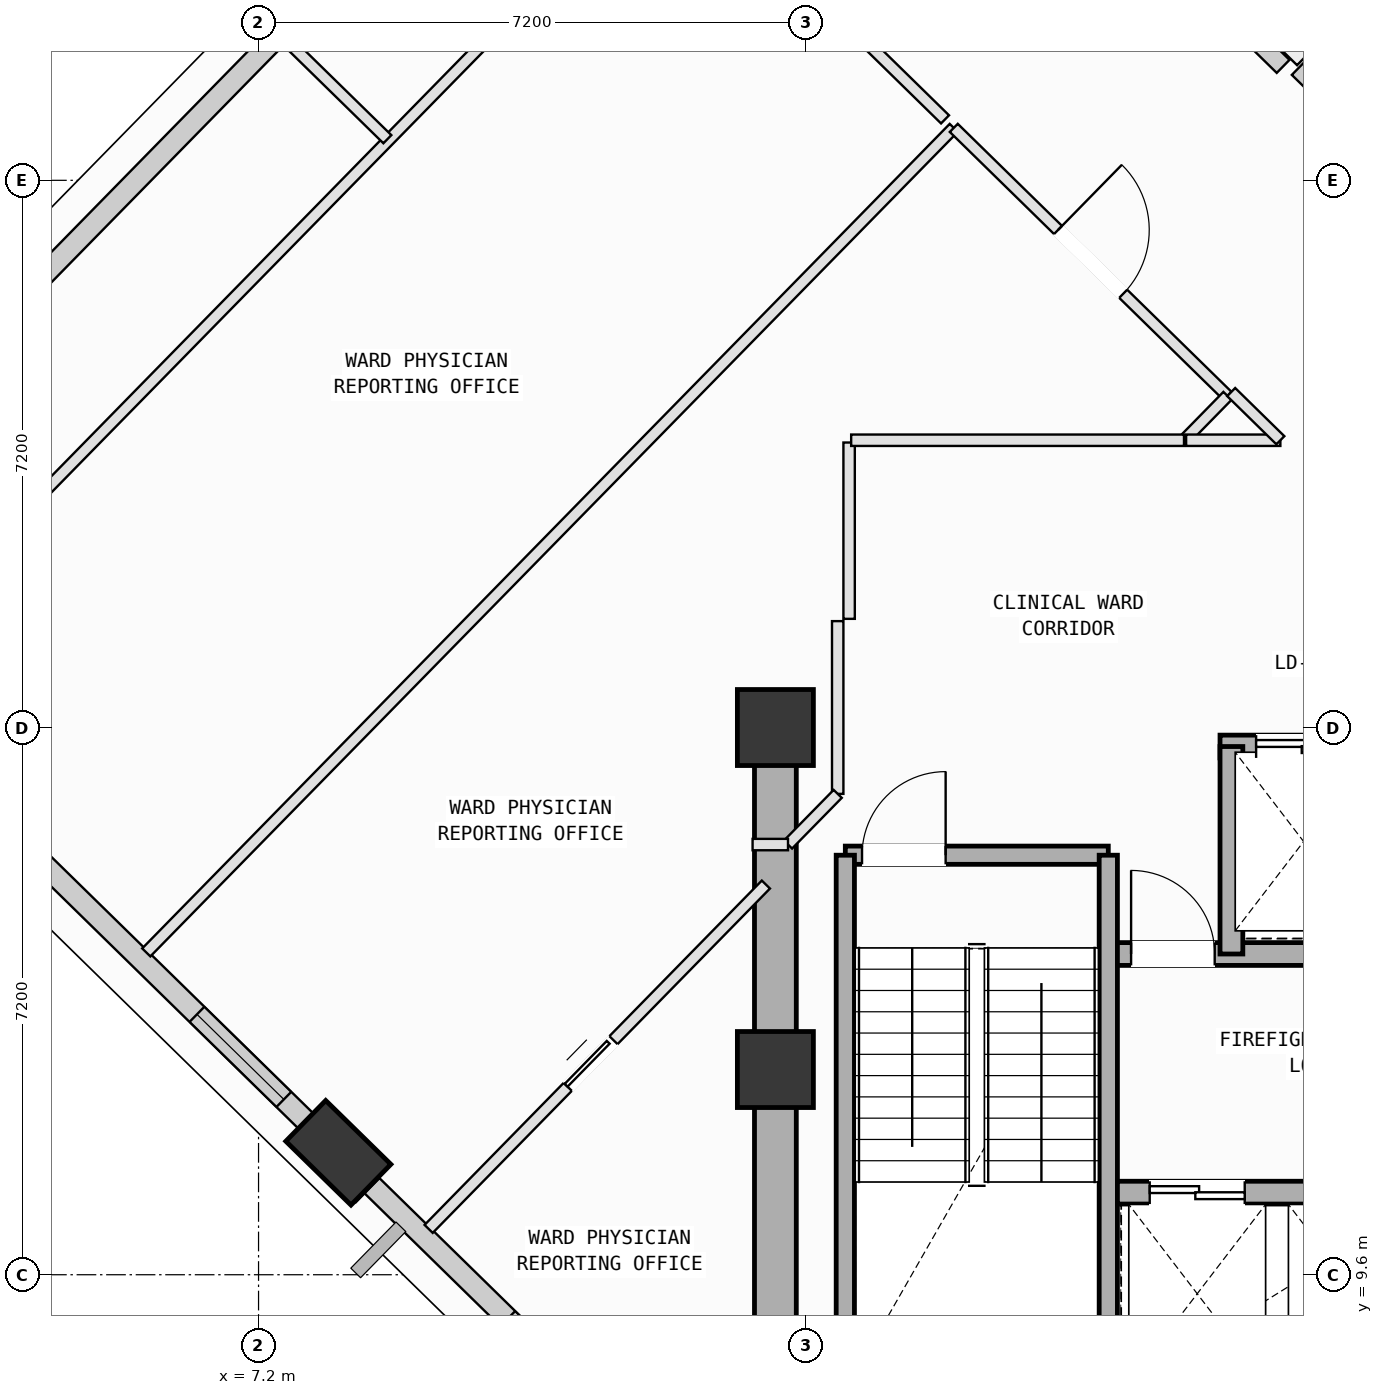
"""IFC4 building model, lengths in metres.
Left out: names, types, materials, properties, quantities, classifications, styles, units other than length and angle.
Written with IfcOpenShell. Run it as: python <this file> out.ifc"""

import sys

from ifc_helpers import new_model, si_unit, direction, frame, frame_2d, origin, origin_2d, place, context, subcontext, project, spatial, rectangle, extrude, element, fill, save


model = new_model("IFC4")
c1 = context("Model", 3, precision=1e-05, world=origin(), true_north=direction((0.0, 1.0)))
c2 = subcontext(c1, "Body", "Model", "MODEL_VIEW")
j1 = project(units=[si_unit("LENGTHUNIT", "METRE"), si_unit("PLANEANGLEUNIT", "RADIAN")], contexts=[c1])
p1 = place(None, origin())
s1 = spatial("IfcSite", under=j1, at=p1, CompositionType="ELEMENT")
p2 = place(p1, origin())
s2 = spatial("IfcBuilding", under=s1, at=p2, CompositionType="ELEMENT")
p3 = place(p2, frame((0.0, 0.0, 219.2)))
s3 = spatial("IfcBuildingStorey", under=s2, at=p3, CompositionType="ELEMENT", Elevation=219.2)
for number, where, z_axis, x_axis in (
    (1, (14.0, 12.3, 0.0), (0.0, 0.0, 1.0), (1.0, 0.0, 0.0)),
    (2, (14.0, 16.8, 0.0), (0.0, 0.0, 1.0), (1.0, 0.0, 0.0)),
):
    element("IfcColumn", number, at=place(p3, frame(where, z_axis=z_axis, x_axis=x_axis)), inside=s3, PredefinedType="COLUMN", context=c2, shape_type="SweptSolid", body=[
        extrude(rectangle(XDim=1.0, YDim=1.0, at=origin_2d()), origin(), (0.0, 0.0, 1.0), 4.0),
    ])
p4 = place(p3, frame((8.25, 11.205, 0.002), z_axis=(0.05677931028, -0.103852755554, 0.992970651675), x_axis=(-0.960175021282, 0.266844486947, 0.082812730257)))
e3 = element("IfcColumn", 3, at=p4, inside=s3, PredefinedType="COLUMN", context=c2, shape_type="SweptSolid", body=[
    extrude(rectangle(XDim=1.2, YDim=0.75, at=origin_2d()), origin(), (0.0, 0.0, 1.0), 4.025),
])
p5 = place(p3, frame((15.708, 30.369, 0.0), z_axis=(0.0, 0.0, 1.0), x_axis=(0.71445197499, -0.699684482773, 0.0)))
e4 = element("IfcWall", 4, at=p5, inside=s3, PredefinedType="SOLIDWALL", context=c2, shape_type="SweptSolid", body=[
    extrude(rectangle(XDim=6.96, YDim=0.24, at=frame_2d((3.48, 0.0))), origin(), (0.0, 0.0, 1.0), 3.265),
])
p6 = place(p5, frame((3.597, 0.0, 0.0)))
e5 = element("IfcOpeningElement", 5, at=p6, cuts=e4, PredefinedType="OPENING", context=c2, shape_type="SweptSolid", body=[
    extrude(rectangle(XDim=1.1, YDim=2.15, at=frame_2d((0.55, 1.075))), frame((0.0, 0.13, 0.0), z_axis=(0.0, -1.0, 0.0), x_axis=(1.0, 0.0, 0.0)), (0.0, 0.0, 1.0), 0.26),
])
p7 = place(p3, frame((20.88, 25.303, 0.0), z_axis=(0.0, 0.0, 1.0), x_axis=(0.699645566709, 0.714490084595, 0.0)))
e6 = element("IfcWall", 6, at=p7, inside=s3, PredefinedType="SOLIDWALL", context=c2, shape_type="SweptSolid", body=[
    extrude(rectangle(XDim=2.5, YDim=0.24, at=frame_2d((1.25, 0.0))), origin(), (0.0, 0.0, 1.0), 3.265),
])
p8 = place(p3, frame((2.724, 21.069, 0.0), z_axis=(0.0, 0.0, 1.0), x_axis=(0.699663647381, 0.714472379125, 0.0)))
e7 = element("IfcWall", 7, at=p8, inside=s3, PredefinedType="SOLIDWALL", context=c2, shape_type="SweptSolid", body=[
    extrude(rectangle(XDim=7.485, YDim=0.28, at=frame_2d((3.742, 0.0))), origin(), (0.0, 0.0, 1.0), 3.265),
])
p9 = place(p3, frame((8.133, 11.319, 0.0), z_axis=(0.0, 0.0, 1.0), x_axis=(-0.714479464063, 0.699656412414, 0.0)))
e8 = element("IfcWall", 8, at=p9, inside=s3, PredefinedType="SOLIDWALL", context=c2, shape_type="SweptSolid", body=[
    extrude(rectangle(XDim=5.831, YDim=0.28, at=frame_2d((2.915, 0.0))), origin(), (0.0, 0.0, 1.0), 3.265),
])
p10 = place(p9, frame((0.84, 0.0, 0.75)))
e9 = element("IfcOpeningElement", 9, at=p10, cuts=e8, PredefinedType="OPENING", context=c2, shape_type="SweptSolid", body=[
    extrude(rectangle(XDim=1.6, YDim=1.95, at=frame_2d((0.8, 0.975))), frame((0.0, 0.15, 0.0), z_axis=(0.0, -1.0, 0.0), x_axis=(1.0, 0.0, 0.0)), (0.0, 0.0, 1.0), 0.3),
])
p11 = place(p3, frame((12.88, 6.671, 0.0), z_axis=(0.0, 0.0, 1.0), x_axis=(-0.714482661458, 0.699653147263, 0.0)))
e10 = element("IfcWall", 10, at=p11, inside=s3, PredefinedType="SOLIDWALL", context=c2, shape_type="SweptSolid", body=[
    extrude(rectangle(XDim=5.861, YDim=0.28, at=frame_2d((2.93, 0.0))), origin(), (0.0, 0.0, 1.0), 3.265),
])
p12 = place(p11, frame((1.36, 0.0, 0.75)))
e11 = element("IfcOpeningElement", 11, at=p12, cuts=e10, PredefinedType="OPENING", context=c2, shape_type="SweptSolid", body=[
    extrude(rectangle(XDim=2.0, YDim=1.95, at=frame_2d((1.0, 0.975))), frame((0.0, 0.15, 0.0), z_axis=(0.0, -1.0, 0.0), x_axis=(1.0, 0.0, 0.0)), (0.0, 0.0, 1.0), 0.3),
])
p13 = place(p3, frame((14.92, 15.12, 0.0), z_axis=(0.0, 0.0, 1.0), x_axis=(1.0, 0.0, 0.0)))
e12 = element("IfcWall", 12, at=p13, inside=s3, PredefinedType="SOLIDWALL", context=c2, shape_type="SweptSolid", body=[
    extrude(rectangle(XDim=3.46, YDim=0.24, at=frame_2d((1.73, 0.0))), origin(), (0.0, 0.0, 1.0), 3.78),
])
p14 = place(p13, frame((0.22, 0.0, 0.0)))
e13 = element("IfcOpeningElement", 13, at=p14, cuts=e12, PredefinedType="OPENING", context=c2, shape_type="SweptSolid", body=[
    extrude(rectangle(XDim=1.1, YDim=2.15, at=frame_2d((0.55, 1.075))), frame((0.0, 0.13, 0.0), z_axis=(0.0, -1.0, 0.0), x_axis=(1.0, 0.0, 0.0)), (0.0, 0.0, 1.0), 0.26),
])
for number, where, z_axis, x_axis in (
    (14, (18.38, 15.12, 0.0), (0.0, 0.0, 1.0), (0.0, -1.0, 0.0)),
    (15, (14.92, 8.075, 0.0), (0.0, 0.0, 1.0), (0.0, 1.0, 0.0)),
):
    element("IfcWall", number, at=place(p3, frame(where, z_axis=z_axis, x_axis=x_axis)), inside=s3, PredefinedType="SOLIDWALL", context=c2, shape_type="SweptSolid", body=[
        extrude(rectangle(XDim=7.045, YDim=0.24, at=frame_2d((3.522, 0.0))), origin(), (0.0, 0.0, 1.0), 3.78),
    ])
p15 = place(p3, frame((14.0, 16.8, 0.0), z_axis=(0.0, 0.0, 1.0), x_axis=(0.0, -1.0, 0.0)))
e16 = element("IfcWall", 16, at=p15, inside=s3, PredefinedType="SHEAR", context=c2, shape_type="SweptSolid", body=[
    extrude(rectangle(XDim=9.0, YDim=0.55, at=frame_2d((4.5, 0.0))), origin(), (0.0, 0.0, 1.0), 3.78),
])
p16 = place(p3, frame((19.85, 16.55, 0.0), z_axis=(0.0, 0.0, 1.0), x_axis=(1.0, 0.0, 0.0)))
e17 = element("IfcWall", 17, at=p16, inside=s3, PredefinedType="SOLIDWALL", context=c2, shape_type="SweptSolid", body=[
    extrude(rectangle(XDim=4.45, YDim=0.3, at=frame_2d((2.225, 0.0))), origin(), (0.0, 0.0, 1.0), 3.78),
])
p17 = place(p16, frame((0.475, 0.0, 0.0)))
e18 = element("IfcOpeningElement", 18, at=p17, cuts=e17, PredefinedType="OPENING", context=c2, shape_type="SweptSolid", body=[
    extrude(rectangle(XDim=1.25, YDim=2.18, at=frame_2d((0.625, 1.09))), frame((0.0, 0.16, 0.0), z_axis=(0.0, -1.0, 0.0), x_axis=(1.0, 0.0, 0.0)), (0.0, 0.0, 1.0), 0.32),
])
p18 = place(p16, frame((2.49, 0.0, 0.0)))
e19 = element("IfcOpeningElement", 19, at=p18, cuts=e17, PredefinedType="OPENING", context=c2, shape_type="SweptSolid", body=[
    extrude(rectangle(XDim=1.02, YDim=2.12, at=frame_2d((0.51, 1.06))), frame((0.0, 0.16, 0.0), z_axis=(0.0, -1.0, 0.0), x_axis=(1.0, 0.0, 0.0)), (0.0, 0.0, 1.0), 0.32),
])
p19 = place(p3, frame((18.5, 10.68, 0.0), z_axis=(0.0, 0.0, 1.0), x_axis=(1.0, 0.0, 0.0)))
e20 = element("IfcWall", 20, at=p19, inside=s3, PredefinedType="SOLIDWALL", context=c2, shape_type="SweptSolid", body=[
    extrude(rectangle(XDim=5.3, YDim=0.3, at=frame_2d((2.65, 0.0))), origin(), (0.0, 0.0, 1.0), 3.78),
])
p20 = place(p19, frame((4.22, 0.0, 0.0)))
e21 = element("IfcOpeningElement", 21, at=p20, cuts=e20, PredefinedType="OPENING", context=c2, shape_type="SweptSolid", body=[
    extrude(rectangle(XDim=0.86, YDim=2.06, at=frame_2d((0.43, 1.03))), frame((0.0, 0.16, 0.0), z_axis=(0.0, -1.0, 0.0), x_axis=(1.0, 0.0, 0.0)), (0.0, 0.0, 1.0), 0.32),
])
p21 = place(p19, frame((0.425, 0.0, 0.0)))
e22 = element("IfcOpeningElement", 22, at=p21, cuts=e20, PredefinedType="OPENING", context=c2, shape_type="SweptSolid", body=[
    extrude(rectangle(XDim=1.25, YDim=2.18, at=frame_2d((0.625, 1.09))), frame((0.0, 0.16, 0.0), z_axis=(0.0, -1.0, 0.0), x_axis=(1.0, 0.0, 0.0)), (0.0, 0.0, 1.0), 0.32),
])
p22 = place(p19, frame((2.525, 0.0, 0.0)))
e23 = element("IfcOpeningElement", 23, at=p22, cuts=e20, PredefinedType="OPENING", context=c2, shape_type="SweptSolid", body=[
    extrude(rectangle(XDim=1.25, YDim=2.18, at=frame_2d((0.625, 1.09))), frame((0.0, 0.16, 0.0), z_axis=(0.0, -1.0, 0.0), x_axis=(1.0, 0.0, 0.0)), (0.0, 0.0, 1.0), 0.32),
])
p23 = place(p3, frame((18.5, 13.82, 0.0), z_axis=(0.0, 0.0, 1.0), x_axis=(1.0, 0.0, 0.0)))
e24 = element("IfcWall", 24, at=p23, inside=s3, PredefinedType="SOLIDWALL", context=c2, shape_type="SweptSolid", body=[
    extrude(rectangle(XDim=5.3, YDim=0.3, at=frame_2d((2.65, 0.0))), origin(), (0.0, 0.0, 1.0), 3.78),
])
p24 = place(p23, frame((0.18, 0.0, 0.0)))
e25 = element("IfcOpeningElement", 25, at=p24, cuts=e24, PredefinedType="OPENING", context=c2, shape_type="SweptSolid", body=[
    extrude(rectangle(XDim=1.1, YDim=2.15, at=frame_2d((0.55, 1.075))), frame((0.0, 0.16, 0.0), z_axis=(0.0, -1.0, 0.0), x_axis=(1.0, 0.0, 0.0)), (0.0, 0.0, 1.0), 0.32),
])
p25 = place(p3, frame((20.0, 13.82, 0.0), z_axis=(0.0, 0.0, 1.0), x_axis=(0.0, 1.0, 0.0)))
e26 = element("IfcWall", 26, at=p25, inside=s3, PredefinedType="SOLIDWALL", context=c2, shape_type="SweptSolid", body=[
    extrude(rectangle(XDim=2.73, YDim=0.3, at=frame_2d((1.365, 0.0))), origin(), (0.0, 0.0, 1.0), 3.78),
])
p26 = place(p3, frame((9.438, 10.203, 0.0), z_axis=(0.0, 0.0, 1.0), x_axis=(0.699657139169, 0.714478752385, 0.0)))
e27 = element("IfcWall", 27, at=p26, inside=s3, PredefinedType="PARTITIONING", context=c2, shape_type="SweptSolid", body=[
    extrude(rectangle(XDim=6.342, YDim=0.15, at=frame_2d((3.171, 0.0))), origin(), (0.0, 0.0, 1.0), 3.78),
])
p27 = place(p26, frame((2.616, 0.0, 0.0)))
e28 = element("IfcOpeningElement", 28, at=p27, cuts=e27, PredefinedType="OPENING", context=c2, shape_type="SweptSolid", body=[
    extrude(rectangle(XDim=0.86, YDim=2.06, at=frame_2d((0.43, 1.03))), frame((0.0, 0.085, 0.0), z_axis=(0.0, -1.0, 0.0), x_axis=(1.0, 0.0, 0.0)), (0.0, 0.0, 1.0), 0.17),
])
p28 = place(p3, frame((14.97, 20.55, 0.0), z_axis=(0.0, 0.0, 1.0), x_axis=(0.0, -1.0, 0.0)))
e29 = element("IfcWall", 29, at=p28, inside=s3, PredefinedType="PARTITIONING", context=c2, shape_type="SweptSolid", body=[
    extrude(rectangle(XDim=2.32, YDim=0.15, at=frame_2d((1.16, 0.0))), origin(), (0.0, 0.0, 1.0), 3.78),
])
p29 = place(p3, frame((14.82, 18.2, 0.0), z_axis=(0.0, 0.0, 1.0), x_axis=(0.0, -1.0, 0.0)))
e30 = element("IfcWall", 30, at=p29, inside=s3, PredefinedType="PARTITIONING", context=c2, shape_type="SweptSolid", body=[
    extrude(rectangle(XDim=2.273, YDim=0.15, at=frame_2d((1.136, 0.0))), origin(), (0.0, 0.0, 1.0), 3.78),
])
p30 = place(p3, frame((14.82, 15.927, 0.0), z_axis=(0.0, 0.0, 1.0), x_axis=(-0.700147182602, -0.713998545303, 0.0)))
e31 = element("IfcWall", 31, at=p30, inside=s3, PredefinedType="PARTITIONING", context=c2, shape_type="SweptSolid", body=[
    extrude(rectangle(XDim=0.934, YDim=0.15, at=frame_2d((0.467, 0.0))), origin(), (0.0, 0.0, 1.0), 3.78),
])
p31 = place(p3, frame((14.166, 15.26, 0.0), z_axis=(0.0, 0.0, 1.0), x_axis=(-1.0, 0.0, 0.0)))
e32 = element("IfcWall", 32, at=p31, inside=s3, PredefinedType="PARTITIONING", context=c2, shape_type="SweptSolid", body=[
    extrude(rectangle(XDim=0.466, YDim=0.15, at=frame_2d((0.233, 0.0))), origin(), (0.0, 0.0, 1.0), 3.78),
])
p32 = place(p3, frame((8.532, 10.607, 0.0), z_axis=(0.0, 0.0, 1.0), x_axis=(-0.714698587823, 0.699432576139, 0.0)))
e33 = element("IfcWall", 33, at=p32, inside=s3, PredefinedType="PARTITIONING", context=c2, shape_type="SweptSolid", body=[
    extrude(rectangle(XDim=0.784, YDim=0.15, at=frame_2d((0.392, 0.0))), origin(), (0.0, 0.0, 1.0), 3.265),
])
p33 = place(p3, frame((5.723, 13.841, 0.0), z_axis=(0.0, 0.0, 1.0), x_axis=(0.69966395239, 0.714472080438, 0.0)))
e34 = element("IfcWall", 34, at=p33, inside=s3, PredefinedType="PARTITIONING", context=c2, shape_type="SweptSolid", body=[
    extrude(rectangle(XDim=15.185, YDim=0.15, at=frame_2d((7.592, 0.0))), origin(), (0.0, 0.0, 1.0), 3.78),
])
p34 = place(p3, frame((16.347, 24.69, 0.0), z_axis=(0.0, 0.0, 1.0), x_axis=(0.714527579213, -0.699607274508, 0.0)))
e35 = element("IfcWall", 35, at=p34, inside=s3, PredefinedType="PARTITIONING", context=c2, shape_type="SweptSolid", body=[
    extrude(rectangle(XDim=5.04, YDim=0.15, at=frame_2d((2.52, 0.0))), origin(), (0.0, 0.0, 1.0), 3.78),
])
p35 = place(p34, frame((1.92, 0.0, 0.0)))
e36 = element("IfcOpeningElement", 36, at=p35, cuts=e35, PredefinedType="OPENING", context=c2, shape_type="SweptSolid", body=[
    extrude(rectangle(XDim=1.2, YDim=2.15, at=frame_2d((0.6, 1.075))), frame((0.0, 0.085, 0.0), z_axis=(0.0, -1.0, 0.0), x_axis=(1.0, 0.0, 0.0)), (0.0, 0.0, 1.0), 0.17),
])
p36 = place(p3, frame((19.948, 21.164, 0.0), z_axis=(0.0, 0.0, 1.0), x_axis=(-0.699751841197, -0.714386002622, 0.0)))
e37 = element("IfcWall", 37, at=p36, inside=s3, PredefinedType="PARTITIONING", context=c2, shape_type="SweptSolid", body=[
    extrude(rectangle(XDim=0.817, YDim=0.15, at=frame_2d((0.409, 0.0))), origin(), (0.0, 0.0, 1.0), 3.78),
])
p37 = place(p3, frame((19.376, 20.58, 0.0), z_axis=(0.0, 0.0, 1.0), x_axis=(-1.0, 0.0, 0.0)))
e38 = element("IfcWall", 38, at=p37, inside=s3, PredefinedType="PARTITIONING", context=c2, shape_type="SweptSolid", body=[
    extrude(rectangle(XDim=4.379, YDim=0.15, at=frame_2d((2.189, 0.0))), origin(), (0.0, 0.0, 1.0), 3.78),
])
p38 = place(p3, frame((3.136, 18.633, 0.0), z_axis=(0.0, 0.0, 1.0), x_axis=(0.699746859046, 0.71439088268, 0.0)))
e39 = element("IfcWall", 39, at=p38, inside=s3, PredefinedType="PARTITIONING", context=c2, shape_type="SweptSolid", body=[
    extrude(rectangle(XDim=13.571, YDim=0.15, at=frame_2d((6.785, 0.0))), origin(), (0.0, 0.0, 1.0), 3.78),
])
p39 = place(p3, frame((12.632, 28.328, 0.0), z_axis=(0.0, 0.0, 1.0), x_axis=(0.714408997324, -0.699728364826, 0.0)))
e40 = element("IfcWall", 40, at=p39, inside=s3, PredefinedType="PARTITIONING", context=c2, shape_type="SweptSolid", body=[
    extrude(rectangle(XDim=5.039, YDim=0.15, at=frame_2d((2.52, 0.0))), origin(), (0.0, 0.0, 1.0), 3.78),
])
p40 = place(p39, frame((1.92, 0.0, 0.0)))
e41 = element("IfcOpeningElement", 41, at=p40, cuts=e40, PredefinedType="OPENING", context=c2, shape_type="SweptSolid", body=[
    extrude(rectangle(XDim=1.2, YDim=2.15, at=frame_2d((0.6, 1.075))), frame((0.0, 0.085, 0.0), z_axis=(0.0, -1.0, 0.0), x_axis=(1.0, 0.0, 0.0)), (0.0, 0.0, 1.0), 0.17),
])
p41 = place(p3, frame((20.644, 20.58, 0.0), z_axis=(0.0, 0.0, 1.0), x_axis=(-1.0, 0.0, 0.0)))
e42 = element("IfcWall", 42, at=p41, inside=s3, PredefinedType="PARTITIONING", context=c2, shape_type="SweptSolid", body=[
    extrude(rectangle(XDim=1.24, YDim=0.15, at=frame_2d((0.62, 0.0))), origin(), (0.0, 0.0, 1.0), 3.78),
])
p42 = place(p3, frame((8.895, 24.541, 0.0), z_axis=(0.0, 0.0, 1.0), x_axis=(-0.714592202045, 0.699541267386, 0.0)))
e43 = element("IfcWall", 43, at=p42, inside=s3, PredefinedType="PARTITIONING", context=c2, shape_type="SweptSolid", body=[
    extrude(rectangle(XDim=1.865, YDim=0.15, at=frame_2d((0.933, 0.0))), origin(), (0.0, 0.0, 1.0), 3.78),
])
p43 = place(p3, frame((19.997, 21.214, 0.0), z_axis=(0.0, 0.0, 1.0), x_axis=(0.714212839143, -0.69992858236, 0.0)))
e44 = element("IfcWall", 44, at=p43, inside=s3, PredefinedType="PARTITIONING", context=c2, shape_type="SweptSolid", body=[
    extrude(rectangle(XDim=0.906, YDim=0.15, at=frame_2d((0.453, 0.0))), origin(), (0.0, 0.0, 1.0), 3.78),
])
p44 = place(p10, origin())
e45 = element("IfcWindow", 45, at=p44, inside=s3, PartitioningType="SINGLE_PANEL", PredefinedType="WINDOW", context=c2, shape_type="SweptSolid", body=[
    extrude(rectangle(XDim=1.6, YDim=1.95, at=frame_2d((0.8, 0.975))), frame((0.0, 0.03, 0.0), z_axis=(0.0, -1.0, 0.0), x_axis=(1.0, 0.0, 0.0)), (0.0, 0.0, 1.0), 0.06),
])
fill(e9, e45)
p45 = place(p14, origin())
e46 = element("IfcDoor", 46, at=p45, inside=s3, OperationType="SINGLE_SWING_RIGHT", PredefinedType="DOOR", context=c2, shape_type="SweptSolid", body=[
    extrude(rectangle(XDim=1.1, YDim=2.15, at=frame_2d((0.55, 1.075))), frame((0.0, 0.025, 0.0), z_axis=(0.0, -1.0, 0.0), x_axis=(1.0, 0.0, 0.0)), (0.0, 0.0, 1.0), 0.05),
])
fill(e13, e46)
p46 = place(p24, origin())
e47 = element("IfcDoor", 47, at=p46, inside=s3, OperationType="SINGLE_SWING_LEFT", PredefinedType="DOOR", context=c2, shape_type="SweptSolid", body=[
    extrude(rectangle(XDim=1.1, YDim=2.15, at=frame_2d((0.55, 1.075))), frame((0.0, 0.025, 0.0), z_axis=(0.0, -1.0, 0.0), x_axis=(1.0, 0.0, 0.0)), (0.0, 0.0, 1.0), 0.05),
])
fill(e25, e47)
p47 = place(p21, origin())
e48 = element("IfcDoor", 48, at=p47, inside=s3, OperationType="DOUBLE_DOOR_SLIDING", PredefinedType="DOOR", context=c2, shape_type="SweptSolid", body=[
    extrude(rectangle(XDim=1.25, YDim=2.18, at=frame_2d((0.625, 1.09))), frame((0.0, 0.025, 0.0), z_axis=(0.0, -1.0, 0.0), x_axis=(1.0, 0.0, 0.0)), (0.0, 0.0, 1.0), 0.05),
])
fill(e22, e48)
p48 = place(p17, origin())
e49 = element("IfcDoor", 49, at=p48, inside=s3, OperationType="DOUBLE_DOOR_SLIDING", PredefinedType="DOOR", context=c2, shape_type="SweptSolid", body=[
    extrude(rectangle(XDim=1.25, YDim=2.18, at=frame_2d((0.625, 1.09))), frame((0.0, 0.025, 0.0), z_axis=(0.0, -1.0, 0.0), x_axis=(1.0, 0.0, 0.0)), (0.0, 0.0, 1.0), 0.05),
])
fill(e18, e49)
p49 = place(p35, origin())
e50 = element("IfcDoor", 50, at=p49, inside=s3, OperationType="SINGLE_SWING_LEFT", PredefinedType="DOOR", context=c2, shape_type="SweptSolid", body=[
    extrude(rectangle(XDim=1.2, YDim=2.15, at=frame_2d((0.6, 1.075))), frame((0.0, 0.025, 0.0), z_axis=(0.0, -1.0, 0.0), x_axis=(1.0, 0.0, 0.0)), (0.0, 0.0, 1.0), 0.05),
])
fill(e36, e50)
p50 = place(p27, origin())
e51 = element("IfcDoor", 51, at=p50, inside=s3, OperationType="SLIDING_TO_LEFT", PredefinedType="DOOR", context=c2, shape_type="SweptSolid", body=[
    extrude(rectangle(XDim=0.86, YDim=2.06, at=frame_2d((0.43, 1.03))), frame((0.0, 0.025, 0.0), z_axis=(0.0, -1.0, 0.0), x_axis=(1.0, 0.0, 0.0)), (0.0, 0.0, 1.0), 0.05),
])
fill(e28, e51)
save(model, sys.argv[1])
